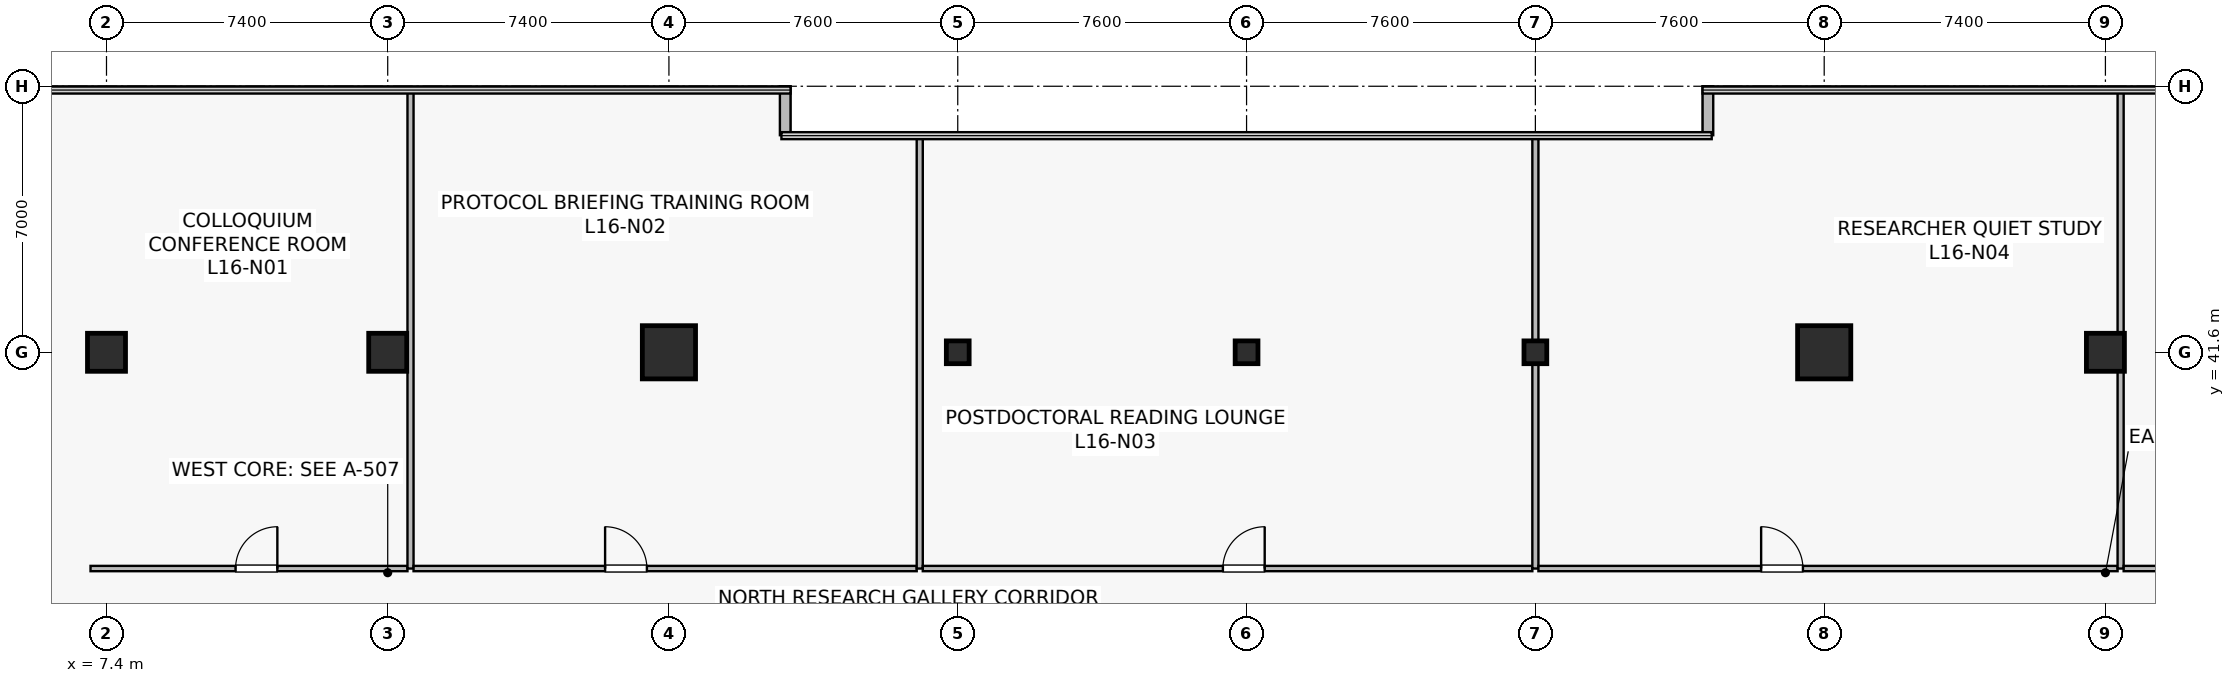
"""IFC4 building model, lengths in metres.
Left out: names, types, materials, properties, quantities, classifications, styles, units other than length and angle.
Written with IfcOpenShell. Run it as: python <this file> out.ifc"""

import sys

from ifc_helpers import new_model, si_unit, direction, frame, frame_2d, origin, origin_2d, place, context, subcontext, project, spatial, rectangle, hollow_rectangle, extrude, source, transform, mapped, element, fill, save


model = new_model("IFC4")
c1 = context("Model", 3, precision=1e-05, world=origin(), true_north=direction((0.0, 1.0)))
c2 = subcontext(c1, "Body", "Model", "MODEL_VIEW")
j1 = project(units=[si_unit("LENGTHUNIT", "METRE"), si_unit("PLANEANGLEUNIT", "RADIAN")], contexts=[c1])
p1 = place(None, origin())
s1 = spatial("IfcSite", under=j1, at=p1, CompositionType="ELEMENT")
p2 = place(p1, origin())
s2 = spatial("IfcBuilding", under=s1, at=p2, CompositionType="ELEMENT")
p3 = place(p2, frame((0.0, 0.0, 66.2)))
s3 = spatial("IfcBuildingStorey", under=s2, at=p3, CompositionType="ELEMENT", Elevation=66.2)
m1 = source(origin(), c2, "Body", "SweptSolid", [
    extrude(rectangle(XDim=1.0, YDim=1.0, at=origin_2d()), origin(), (0.0, 0.0, 1.0), 4.1),
])
p4 = place(p3, frame((14.8, 41.6, 0.0), z_axis=(0.0, 0.0, 1.0), x_axis=(1.0, 0.0, 0.0)))
e1 = element("IfcColumn", 1, at=p4, inside=s3, PredefinedType="COLUMN", context=c2, shape_type="MappedRepresentation", body=[
    mapped(m1, transform((0.0, 0.0, 0.0), scale=1.0)),
])
m2 = source(origin(), c2, "Body", "SweptSolid", [
    extrude(rectangle(XDim=1.4, YDim=1.4, at=origin_2d()), origin(), (0.0, 0.0, 1.0), 4.1),
])
for number, where, z_axis, x_axis in (
    (2, (22.2, 41.6, 0.0), (0.0, 0.0, 1.0), (1.0, 0.0, 0.0)),
    (3, (52.6, 41.6, 0.0), (0.0, 0.0, 1.0), (1.0, 0.0, 0.0)),
):
    element("IfcColumn", number, at=place(p3, frame(where, z_axis=z_axis, x_axis=x_axis)), inside=s3, PredefinedType="COLUMN", context=c2, shape_type="MappedRepresentation", body=[
        mapped(m2, transform((0.0, 0.0, 0.0), scale=1.0)),
    ])
for number, where, z_axis, x_axis in (
    (4, (60.0, 41.6, 0.0), (0.0, 0.0, 1.0), (1.0, 0.0, 0.0)),
    (5, (7.4, 41.6, 0.0), (0.0, 0.0, 1.0), (1.0, 0.0, 0.0)),
):
    element("IfcColumn", number, at=place(p3, frame(where, z_axis=z_axis, x_axis=x_axis)), inside=s3, PredefinedType="COLUMN", context=c2, shape_type="MappedRepresentation", body=[
        mapped(m1, transform((0.0, 0.0, 0.0), scale=1.0)),
    ])
m3 = source(origin(), c2, "Body", "SweptSolid", [
    extrude(hollow_rectangle(XDim=0.6, YDim=0.6, WallThickness=0.028, at=origin_2d()), origin(), (0.0, 0.0, 1.0), 4.1),
])
for number, where, z_axis, x_axis in (
    (6, (29.8, 41.6, 0.0), (0.0, 0.0, 1.0), (1.0, 0.0, 0.0)),
    (7, (37.4, 41.6, 0.0), (0.0, 0.0, 1.0), (1.0, 0.0, 0.0)),
    (8, (45.0, 41.6, 0.0), (0.0, 0.0, 1.0), (1.0, 0.0, 0.0)),
):
    element("IfcColumn", number, at=place(p3, frame(where, z_axis=z_axis, x_axis=x_axis)), inside=s3, PredefinedType="COLUMN", context=c2, shape_type="MappedRepresentation", body=[
        mapped(m3, transform((0.0, 0.0, 0.0), scale=1.0)),
    ])
for number, where, z_axis, x_axis in (
    (9, (49.54, 48.6, 0.0), (0.0, 0.0, 1.0), (0.0, -1.0, 0.0)),
    (10, (25.26, 47.312, 0.0), (0.0, 0.0, 1.0), (0.0, 1.0, 0.0)),
):
    element("IfcWall", number, at=place(p3, frame(where, z_axis=z_axis, x_axis=x_axis)), inside=s3, PredefinedType="STANDARD", context=c2, shape_type="SweptSolid", body=[
        extrude(rectangle(XDim=1.288, YDim=0.28, at=frame_2d((0.644, 0.0))), origin(), (0.0, 0.0, 1.0), 3.78),
    ])
p5 = place(p3, frame((6.98, 35.91, 0.0), z_axis=(0.0, 0.0, 1.0), x_axis=(1.0, 0.0, 0.0)))
e11 = element("IfcWall", 11, at=p5, inside=s3, PredefinedType="PARTITIONING", context=c2, shape_type="SweptSolid", body=[
    extrude(rectangle(XDim=8.34, YDim=0.14, at=frame_2d((4.17, 0.0))), origin(), (0.0, 0.0, 1.0), 3.115),
])
p6 = place(p5, frame((3.816, 0.0, 0.0)))
e12 = element("IfcOpeningElement", 12, at=p6, cuts=e11, PredefinedType="OPENING", context=c2, shape_type="SweptSolid", body=[
    extrude(rectangle(XDim=1.1, YDim=2.18, at=frame_2d((0.55, 1.09))), frame((0.0, 0.08, 0.0), z_axis=(0.0, -1.0, 0.0), x_axis=(1.0, 0.0, 0.0)), (0.0, 0.0, 1.0), 0.16),
])
p7 = place(p3, frame((15.4, 35.91, 0.0), z_axis=(0.0, 0.0, 1.0), x_axis=(0.0, 1.0, 0.0)))
e13 = element("IfcWall", 13, at=p7, inside=s3, PredefinedType="PARTITIONING", context=c2, shape_type="SweptSolid", body=[
    extrude(rectangle(XDim=12.58, YDim=0.16, at=frame_2d((6.29, 0.0))), origin(), (0.0, 0.0, 1.0), 3.015),
])
p8 = place(p3, frame((15.48, 35.91, 0.0), z_axis=(0.0, 0.0, 1.0), x_axis=(1.0, 0.0, 0.0)))
e14 = element("IfcWall", 14, at=p8, inside=s3, PredefinedType="PARTITIONING", context=c2, shape_type="SweptSolid", body=[
    extrude(rectangle(XDim=13.24, YDim=0.14, at=frame_2d((6.62, 0.0))), origin(), (0.0, 0.0, 1.0), 3.115),
])
p9 = place(p8, frame((5.04, 0.0, 0.0)))
e15 = element("IfcOpeningElement", 15, at=p9, cuts=e14, PredefinedType="OPENING", context=c2, shape_type="SweptSolid", body=[
    extrude(rectangle(XDim=1.1, YDim=2.18, at=frame_2d((0.55, 1.09))), frame((0.0, 0.08, 0.0), z_axis=(0.0, -1.0, 0.0), x_axis=(1.0, 0.0, 0.0)), (0.0, 0.0, 1.0), 0.16),
])
p10 = place(p3, frame((28.8, 35.91, 0.0), z_axis=(0.0, 0.0, 1.0), x_axis=(0.0, 1.0, 0.0)))
e16 = element("IfcWall", 16, at=p10, inside=s3, PredefinedType="PARTITIONING", context=c2, shape_type="SweptSolid", body=[
    extrude(rectangle(XDim=11.38, YDim=0.16, at=frame_2d((5.69, 0.0))), origin(), (0.0, 0.0, 1.0), 3.015),
])
p11 = place(p3, frame((28.88, 35.91, 0.0), z_axis=(0.0, 0.0, 1.0), x_axis=(1.0, 0.0, 0.0)))
e17 = element("IfcWall", 17, at=p11, inside=s3, PredefinedType="PARTITIONING", context=c2, shape_type="SweptSolid", body=[
    extrude(rectangle(XDim=16.04, YDim=0.14, at=frame_2d((8.02, 0.0))), origin(), (0.0, 0.0, 1.0), 3.115),
])
p12 = place(p11, frame((7.897, 0.0, 0.0)))
e18 = element("IfcOpeningElement", 18, at=p12, cuts=e17, PredefinedType="OPENING", context=c2, shape_type="SweptSolid", body=[
    extrude(rectangle(XDim=1.1, YDim=2.18, at=frame_2d((0.55, 1.09))), frame((0.0, 0.08, 0.0), z_axis=(0.0, -1.0, 0.0), x_axis=(1.0, 0.0, 0.0)), (0.0, 0.0, 1.0), 0.16),
])
p13 = place(p3, frame((45.0, 35.91, 0.0), z_axis=(0.0, 0.0, 1.0), x_axis=(0.0, 1.0, 0.0)))
e19 = element("IfcWall", 19, at=p13, inside=s3, PredefinedType="PARTITIONING", context=c2, shape_type="SweptSolid", body=[
    extrude(rectangle(XDim=11.38, YDim=0.16, at=frame_2d((5.69, 0.0))), origin(), (0.0, 0.0, 1.0), 3.015),
])
p14 = place(p3, frame((45.08, 35.91, 0.0), z_axis=(0.0, 0.0, 1.0), x_axis=(1.0, 0.0, 0.0)))
e20 = element("IfcWall", 20, at=p14, inside=s3, PredefinedType="PARTITIONING", context=c2, shape_type="SweptSolid", body=[
    extrude(rectangle(XDim=15.24, YDim=0.14, at=frame_2d((7.62, 0.0))), origin(), (0.0, 0.0, 1.0), 3.115),
])
p15 = place(p14, frame((5.86, 0.0, 0.0)))
e21 = element("IfcOpeningElement", 21, at=p15, cuts=e20, PredefinedType="OPENING", context=c2, shape_type="SweptSolid", body=[
    extrude(rectangle(XDim=1.1, YDim=2.18, at=frame_2d((0.55, 1.09))), frame((0.0, 0.08, 0.0), z_axis=(0.0, -1.0, 0.0), x_axis=(1.0, 0.0, 0.0)), (0.0, 0.0, 1.0), 0.16),
])
p16 = place(p3, frame((60.4, 35.91, 0.0), z_axis=(0.0, 0.0, 1.0), x_axis=(0.0, 1.0, 0.0)))
e22 = element("IfcWall", 22, at=p16, inside=s3, PredefinedType="PARTITIONING", context=c2, shape_type="SweptSolid", body=[
    extrude(rectangle(XDim=12.58, YDim=0.16, at=frame_2d((6.29, 0.0))), origin(), (0.0, 0.0, 1.0), 3.015),
])
p17 = place(p3, frame((60.48, 35.91, 0.0), z_axis=(0.0, 0.0, 1.0), x_axis=(1.0, 0.0, 0.0)))
e23 = element("IfcWall", 23, at=p17, inside=s3, PredefinedType="PARTITIONING", context=c2, shape_type="SweptSolid", body=[
    extrude(rectangle(XDim=7.34, YDim=0.14, at=frame_2d((3.67, 0.0))), origin(), (0.0, 0.0, 1.0), 3.265),
])
p18 = place(p17, frame((3.339, 0.0, 0.0)))
e24 = element("IfcOpeningElement", 24, at=p18, cuts=e23, PredefinedType="OPENING", context=c2, shape_type="SweptSolid", body=[
    extrude(rectangle(XDim=1.0, YDim=2.15, at=frame_2d((0.5, 1.075))), frame((0.0, 0.08, 0.0), z_axis=(0.0, -1.0, 0.0), x_axis=(1.0, 0.0, 0.0)), (0.0, 0.0, 1.0), 0.16),
])
m4 = source(origin(), c2, "Body", "SweptSolid", [
    extrude(rectangle(XDim=1.1, YDim=2.18, at=frame_2d((0.55, 1.09))), frame((0.0, 0.025, 0.0), z_axis=(0.0, -1.0, 0.0), x_axis=(1.0, 0.0, 0.0)), (0.0, 0.0, 1.0), 0.05),
])
p19 = place(p6, origin())
e25 = element("IfcDoor", 25, at=p19, inside=s3, OperationType="SINGLE_SWING_RIGHT", PredefinedType="DOOR", context=c2, shape_type="MappedRepresentation", body=[
    mapped(m4, transform((0.0, 0.0, 0.0), scale=1.0)),
])
fill(e12, e25)
p20 = place(p9, origin())
e26 = element("IfcDoor", 26, at=p20, inside=s3, OperationType="SINGLE_SWING_LEFT", PredefinedType="DOOR", context=c2, shape_type="MappedRepresentation", body=[
    mapped(m4, transform((0.0, 0.0, 0.0), scale=1.0)),
])
fill(e15, e26)
p21 = place(p12, origin())
e27 = element("IfcDoor", 27, at=p21, inside=s3, OperationType="SINGLE_SWING_RIGHT", PredefinedType="DOOR", context=c2, shape_type="MappedRepresentation", body=[
    mapped(m4, transform((0.0, 0.0, 0.0), scale=1.0)),
])
fill(e18, e27)
p22 = place(p15, origin())
e28 = element("IfcDoor", 28, at=p22, inside=s3, OperationType="SINGLE_SWING_LEFT", PredefinedType="DOOR", context=c2, shape_type="MappedRepresentation", body=[
    mapped(m4, transform((0.0, 0.0, 0.0), scale=1.0)),
])
fill(e21, e28)
save(model, sys.argv[1])
